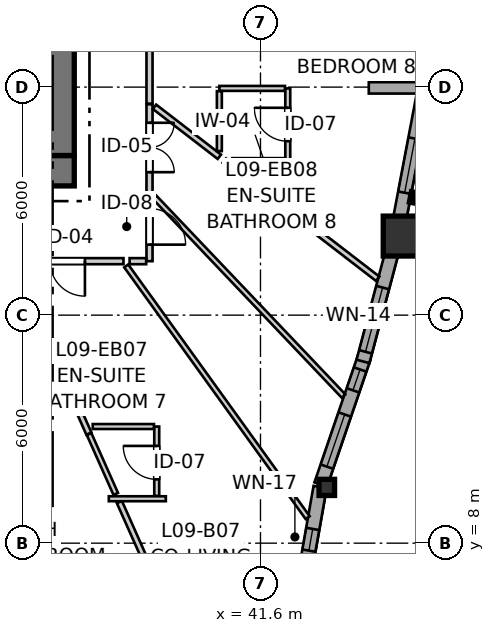
"""IFC4 building model, lengths in metres.
Left out: names, types, materials, properties, quantities, classifications, styles, units other than length and angle.
Written with IfcOpenShell. Run it as: python <this file> out.ifc"""

import sys

from ifc_helpers import new_model, si_unit, direction, frame, frame_2d, origin, origin_2d, place, context, subcontext, project, spatial, rectangle, i_section, extrude, source, transform, mapped, element, fill, save


model = new_model("IFC4")
c1 = context("Model", 3, precision=1e-05, world=origin(), true_north=direction((0.0, 1.0)))
c2 = subcontext(c1, "Body", "Model", "MODEL_VIEW")
j1 = project(units=[si_unit("LENGTHUNIT", "METRE"), si_unit("PLANEANGLEUNIT", "RADIAN")], contexts=[c1])
p1 = place(None, origin())
s1 = spatial("IfcSite", under=j1, at=p1, CompositionType="ELEMENT")
p2 = place(p1, origin())
s2 = spatial("IfcBuilding", under=s1, at=p2, CompositionType="ELEMENT")
p3 = place(p2, frame((0.0, 0.0, 33.4)))
s3 = spatial("IfcBuildingStorey", under=s2, at=p3, CompositionType="ELEMENT", Elevation=33.4)
p4 = place(p3, frame((24.0, 17.8, 0.0), z_axis=(0.0, 0.0, 1.0), x_axis=(1.0, 0.0, 0.0)))
e1 = element("IfcWall", 1, at=p4, inside=s3, PredefinedType="SHEAR", context=c2, shape_type="SweptSolid", body=[
    extrude(rectangle(XDim=12.7, YDim=0.8, at=frame_2d((6.35, 0.0))), origin(), (0.0, 0.0, 1.0), 2.94),
])
p5 = place(p3, frame((36.3, 18.2, 0.0), z_axis=(0.0, 0.0, 1.0), x_axis=(0.0, 1.0, 0.0)))
e2 = element("IfcWall", 2, at=p5, inside=s3, PredefinedType="SHEAR", context=c2, shape_type="SweptSolid", body=[
    extrude(rectangle(XDim=15.6, YDim=0.8, at=frame_2d((7.8, 0.0))), origin(), (0.0, 0.0, 1.0), 2.94),
])
p6 = place(p5, frame((4.25, 0.0, 0.0)))
e3 = element("IfcOpeningElement", 3, at=p6, cuts=e2, PredefinedType="OPENING", context=c2, shape_type="SweptSolid", body=[
    extrude(rectangle(XDim=1.1, YDim=2.15, at=frame_2d((0.55, 1.075))), frame((0.0, 0.41, 0.0), z_axis=(0.0, -1.0, 0.0), x_axis=(1.0, 0.0, 0.0)), (0.0, 0.0, 1.0), 0.82),
])
p7 = place(p5, frame((10.25, 0.0, 0.0)))
e4 = element("IfcOpeningElement", 4, at=p7, cuts=e2, PredefinedType="OPENING", context=c2, shape_type="SweptSolid", body=[
    extrude(rectangle(XDim=1.1, YDim=2.15, at=frame_2d((0.55, 1.075))), frame((0.0, 0.41, 0.0), z_axis=(0.0, -1.0, 0.0), x_axis=(1.0, 0.0, 0.0)), (0.0, 0.0, 1.0), 0.82),
])
m1 = source(origin(), c2, "Body", "SweptSolid", [
    extrude(i_section(OverallWidth=0.409, OverallDepth=0.425, WebThickness=0.03, FlangeThickness=0.048, FilletRadius=0.015, at=origin_2d()), origin(), (0.0, 0.0, 1.0), 2.94),
])
p8 = place(p3, frame((43.345, 9.468, 0.0), z_axis=(0.0, 0.0, 1.0), x_axis=(1.0, 0.0, 0.0)))
e5 = element("IfcColumn", 5, at=p8, inside=s3, PredefinedType="PILASTER", context=c2, shape_type="MappedRepresentation", body=[
    mapped(m1, transform((0.0, 0.0, 0.0), x_axis=(1.0, 0.0, 0.0), y_axis=(0.0, 1.0, 0.0), z_axis=(0.0, 0.0, 1.0), scale=1.0)),
])
m2 = source(origin(), c2, "Body", "SweptSolid", [
    extrude(rectangle(XDim=1.05, YDim=1.05, at=origin_2d()), origin(), (0.0, 0.0, 1.0), 2.94),
])
p9 = place(p3, frame((45.355, 16.081, 0.0), z_axis=(0.0, 0.0, 1.0), x_axis=(1.0, 0.0, 0.0)))
e6 = element("IfcColumn", 6, at=p9, inside=s3, PredefinedType="COLUMN", context=c2, shape_type="MappedRepresentation", body=[
    mapped(m2, transform((0.0, 0.0, 0.0), x_axis=(1.0, 0.0, 0.0), y_axis=(0.0, 1.0, 0.0), z_axis=(0.0, 0.0, 1.0), scale=1.0)),
])
p10 = place(p3, frame((42.816, 7.477, 0.0), z_axis=(0.0, 0.0, 1.0), x_axis=(0.173586593252, 0.984818610021, 0.0)))
e7 = element("IfcWall", 7, at=p10, inside=s3, PredefinedType="SOLIDWALL", context=c2, shape_type="SweptSolid", body=[
    extrude(rectangle(XDim=2.032, YDim=0.35, at=frame_2d((1.016, 0.0))), origin(), (0.0, 0.0, 1.0), 2.42),
])
p11 = place(p10, frame((0.332, 0.0, 0.82)))
e8 = element("IfcOpeningElement", 8, at=p11, cuts=e7, PredefinedType="OPENING", context=c2, shape_type="SweptSolid", body=[
    extrude(rectangle(XDim=0.58, YDim=1.35, at=frame_2d((0.29, 0.675))), frame((0.0, 0.185, 0.0), z_axis=(0.0, -1.0, 0.0), x_axis=(1.0, 0.0, 0.0)), (0.0, 0.0, 1.0), 0.37),
])
p12 = place(p3, frame((43.186, 9.543, 0.0), z_axis=(0.0, 0.0, 1.0), x_axis=(0.323620542135, 0.946186950189, 0.0)))
e9 = element("IfcWall", 9, at=p12, inside=s3, PredefinedType="SOLIDWALL", context=c2, shape_type="SweptSolid", body=[
    extrude(rectangle(XDim=3.512, YDim=0.35, at=frame_2d((1.756, 0.0))), origin(), (0.0, 0.0, 1.0), 2.42),
])
p13 = place(p12, frame((0.498, 0.0, 0.82)))
e10 = element("IfcOpeningElement", 10, at=p13, cuts=e9, PredefinedType="OPENING", context=c2, shape_type="SweptSolid", body=[
    extrude(rectangle(XDim=1.45, YDim=1.25, at=frame_2d((0.725, 0.625))), frame((0.0, 0.185, 0.0), z_axis=(0.0, -1.0, 0.0), x_axis=(1.0, 0.0, 0.0)), (0.0, 0.0, 1.0), 0.37),
])
p14 = place(p12, frame((2.619, 0.0, 0.82)))
e11 = element("IfcOpeningElement", 11, at=p14, cuts=e9, PredefinedType="OPENING", context=c2, shape_type="SweptSolid", body=[
    extrude(rectangle(XDim=0.58, YDim=1.35, at=frame_2d((0.29, 0.675))), frame((0.0, 0.185, 0.0), z_axis=(0.0, -1.0, 0.0), x_axis=(1.0, 0.0, 0.0)), (0.0, 0.0, 1.0), 0.37),
])
p15 = place(p3, frame((44.297, 12.782, 0.0), z_axis=(0.0, 0.0, 1.0), x_axis=(0.257090265476, 0.96638739406, 0.0)))
e12 = element("IfcWall", 12, at=p15, inside=s3, PredefinedType="SOLIDWALL", context=c2, shape_type="SweptSolid", body=[
    extrude(rectangle(XDim=3.159, YDim=0.35, at=frame_2d((1.58, 0.0))), origin(), (0.0, 0.0, 1.0), 2.42),
])
p16 = place(p15, frame((0.261, 0.0, 0.82)))
e13 = element("IfcOpeningElement", 13, at=p16, cuts=e12, PredefinedType="OPENING", context=c2, shape_type="SweptSolid", body=[
    extrude(rectangle(XDim=1.75, YDim=1.3, at=frame_2d((0.875, 0.65))), frame((0.0, 0.185, 0.0), z_axis=(0.0, -1.0, 0.0), x_axis=(1.0, 0.0, 0.0)), (0.0, 0.0, 1.0), 0.37),
])
p17 = place(p3, frame((45.24, 16.408, 0.0), z_axis=(0.0, 0.0, 1.0), x_axis=(0.186636709983, 0.982428999209, 0.0)))
e14 = element("IfcWall", 14, at=p17, inside=s3, PredefinedType="SOLIDWALL", context=c2, shape_type="SweptSolid", body=[
    extrude(rectangle(XDim=3.446, YDim=0.35, at=frame_2d((1.723, 0.0))), origin(), (0.0, 0.0, 1.0), 2.42),
])
p18 = place(p17, frame((0.828, 0.0, 0.82)))
e15 = element("IfcOpeningElement", 15, at=p18, cuts=e14, PredefinedType="OPENING", context=c2, shape_type="SweptSolid", body=[
    extrude(rectangle(XDim=1.45, YDim=1.25, at=frame_2d((0.725, 0.625))), frame((0.0, 0.185, 0.0), z_axis=(0.0, -1.0, 0.0), x_axis=(1.0, 0.0, 0.0)), (0.0, 0.0, 1.0), 0.37),
])
p19 = place(p3, frame((44.45, 19.98, 0.0), z_axis=(0.0, 0.0, 1.0), x_axis=(1.0, 0.0, 0.0)))
e16 = element("IfcWall", 16, at=p19, inside=s3, PredefinedType="SOLIDWALL", context=c2, shape_type="SweptSolid", body=[
    extrude(rectangle(XDim=20.685, YDim=0.3, at=frame_2d((10.342, 0.0))), origin(), (0.0, 0.0, 1.0), 2.12),
])
p20 = place(p3, frame((38.68, 23.699, 0.0), z_axis=(0.0, 0.0, 1.0), x_axis=(0.0, -1.0, 0.0)))
e17 = element("IfcWall", 17, at=p20, inside=s3, PredefinedType="PARTITIONING", context=c2, shape_type="SweptSolid", body=[
    extrude(rectangle(XDim=4.135, YDim=0.16, at=frame_2d((2.067, 0.0))), origin(), (0.0, 0.0, 1.0), 2.94),
])
p21 = place(p20, frame((1.583, 0.0, 0.0)))
e18 = element("IfcOpeningElement", 18, at=p21, cuts=e17, PredefinedType="OPENING", context=c2, shape_type="SweptSolid", body=[
    extrude(rectangle(XDim=0.92, YDim=2.1, at=frame_2d((0.46, 1.05))), frame((0.0, 0.09, 0.0), z_axis=(0.0, -1.0, 0.0), x_axis=(1.0, 0.0, 0.0)), (0.0, 0.0, 1.0), 0.18),
])
p22 = place(p3, frame((37.995, 15.42, 0.0), z_axis=(0.0, 0.0, 1.0), x_axis=(-1.0, 0.0, 0.0)))
e19 = element("IfcWall", 19, at=p22, inside=s3, PredefinedType="PARTITIONING", context=c2, shape_type="SweptSolid", body=[
    extrude(rectangle(XDim=2.9, YDim=0.16, at=frame_2d((1.45, 0.0))), origin(), (0.0, 0.0, 1.0), 2.94),
])
p23 = place(p22, frame((1.014, 0.0, 0.0)))
e20 = element("IfcOpeningElement", 20, at=p23, cuts=e19, PredefinedType="OPENING", context=c2, shape_type="SweptSolid", body=[
    extrude(rectangle(XDim=0.92, YDim=2.1, at=frame_2d((0.46, 1.05))), frame((0.0, 0.09, 0.0), z_axis=(0.0, -1.0, 0.0), x_axis=(1.0, 0.0, 0.0)), (0.0, 0.0, 1.0), 0.18),
])
p24 = place(p3, frame((38.68, 19.549, 0.0), z_axis=(0.0, 0.0, 1.0), x_axis=(0.0, -1.0, 0.0)))
e21 = element("IfcWall", 21, at=p24, inside=s3, PredefinedType="PARTITIONING", context=c2, shape_type="SweptSolid", body=[
    extrude(rectangle(XDim=2.331, YDim=0.16, at=frame_2d((1.166, 0.0))), origin(), (0.0, 0.0, 1.0), 2.94),
])
p25 = place(p24, frame((0.488, 0.0, 0.0)))
e22 = element("IfcOpeningElement", 22, at=p25, cuts=e21, PredefinedType="OPENING", context=c2, shape_type="SweptSolid", body=[
    extrude(rectangle(XDim=1.3, YDim=2.1, at=frame_2d((0.65, 1.05))), frame((0.0, 0.09, 0.0), z_axis=(0.0, -1.0, 0.0), x_axis=(1.0, 0.0, 0.0)), (0.0, 0.0, 1.0), 0.18),
])
p26 = place(p3, frame((42.318, 18.066, 0.0), z_axis=(0.0, 0.0, 1.0), x_axis=(0.0, 1.0, 0.0)))
e23 = element("IfcWall", 23, at=p26, inside=s3, PredefinedType="PARTITIONING", context=c2, shape_type="SweptSolid", body=[
    extrude(rectangle(XDim=1.9, YDim=0.13, at=frame_2d((0.95, 0.0))), origin(), (0.0, 0.0, 1.0), 2.94),
])
p27 = place(p26, frame((0.51, 0.0, 0.0)))
e24 = element("IfcOpeningElement", 24, at=p27, cuts=e23, PredefinedType="OPENING", context=c2, shape_type="SweptSolid", body=[
    extrude(rectangle(XDim=0.88, YDim=2.05, at=frame_2d((0.44, 1.025))), frame((0.0, 0.075, 0.0), z_axis=(0.0, -1.0, 0.0), x_axis=(1.0, 0.0, 0.0)), (0.0, 0.0, 1.0), 0.15),
])
p28 = place(p3, frame((38.87, 9.242, 0.0), z_axis=(0.0, 0.0, 1.0), x_axis=(0.0, 1.0, 0.0)))
e25 = element("IfcWall", 25, at=p28, inside=s3, PredefinedType="PARTITIONING", context=c2, shape_type="SweptSolid", body=[
    extrude(rectangle(XDim=1.827, YDim=0.13, at=frame_2d((0.914, 0.0))), origin(), (0.0, 0.0, 1.0), 2.94),
])
p29 = place(p28, frame((0.437, 0.0, 0.0)))
e26 = element("IfcOpeningElement", 26, at=p29, cuts=e25, PredefinedType="OPENING", context=c2, shape_type="SweptSolid", body=[
    extrude(rectangle(XDim=0.88, YDim=2.05, at=frame_2d((0.44, 1.025))), frame((0.0, 0.075, 0.0), z_axis=(0.0, -1.0, 0.0), x_axis=(1.0, 0.0, 0.0)), (0.0, 0.0, 1.0), 0.15),
])
p30 = place(p3, frame((38.68, 17.203, 0.0), z_axis=(0.0, 0.0, 1.0), x_axis=(0.0, -1.0, 0.0)))
e27 = element("IfcWall", 27, at=p30, inside=s3, PredefinedType="PARTITIONING", context=c2, shape_type="SweptSolid", body=[
    extrude(rectangle(XDim=1.783, YDim=0.16, at=frame_2d((0.892, 0.0))), origin(), (0.0, 0.0, 1.0), 2.94),
])
p31 = place(p30, frame((0.398, 0.0, 0.0)))
e28 = element("IfcOpeningElement", 28, at=p31, cuts=e27, PredefinedType="OPENING", context=c2, shape_type="SweptSolid", body=[
    extrude(rectangle(XDim=0.95, YDim=2.1, at=frame_2d((0.475, 1.05))), frame((0.0, 0.09, 0.0), z_axis=(0.0, -1.0, 0.0), x_axis=(1.0, 0.0, 0.0)), (0.0, 0.0, 1.0), 0.18),
])
p32 = place(p3, frame((38.067, 15.295, 0.0), z_axis=(0.0, 0.0, 1.0), x_axis=(0.584777320582, -0.811193864211, 0.0)))
e29 = element("IfcWall", 29, at=p32, inside=s3, PredefinedType="PARTITIONING", context=c2, shape_type="SweptSolid", body=[
    extrude(rectangle(XDim=8.164, YDim=0.13, at=frame_2d((4.082, 0.0))), origin(), (0.0, 0.0, 1.0), 2.94),
])
p33 = place(p3, frame((38.812, 17.101, 0.0), z_axis=(0.0, 0.0, 1.0), x_axis=(0.689140556814, -0.724627692649, 0.0)))
e30 = element("IfcWall", 30, at=p33, inside=s3, PredefinedType="PARTITIONING", context=c2, shape_type="SweptSolid", body=[
    extrude(rectangle(XDim=7.217, YDim=0.13, at=frame_2d((3.608, 0.0))), origin(), (0.0, 0.0, 1.0), 2.94),
])
p34 = place(p3, frame((40.649, 18.066, 0.0), z_axis=(0.0, 0.0, 1.0), x_axis=(0.792155051101, -0.610319895641, 0.0)))
e31 = element("IfcWall", 31, at=p34, inside=s3, PredefinedType="PARTITIONING", context=c2, shape_type="SweptSolid", body=[
    extrude(rectangle(XDim=5.093, YDim=0.145, at=frame_2d((2.546, 0.0))), origin(), (0.0, 0.0, 1.0), 2.94),
])
p35 = place(p3, frame((37.887, 9.082, 0.0), z_axis=(0.0, 0.0, 1.0), x_axis=(0.406941066305, -0.913454415149, 0.0)))
e32 = element("IfcWall", 32, at=p35, inside=s3, PredefinedType="PARTITIONING", context=c2, shape_type="SweptSolid", body=[
    extrude(rectangle(XDim=4.882, YDim=0.145, at=frame_2d((2.441, 0.0))), origin(), (0.0, 0.0, 1.0), 2.94),
])
p36 = place(p3, frame((35.116, 15.303, 0.0), z_axis=(0.0, 0.0, 1.0), x_axis=(0.406910733823, -0.913467927571, 0.0)))
e33 = element("IfcWall", 33, at=p36, inside=s3, PredefinedType="PARTITIONING", context=c2, shape_type="SweptSolid", body=[
    extrude(rectangle(XDim=4.839, YDim=0.145, at=frame_2d((2.419, 0.0))), origin(), (0.0, 0.0, 1.0), 2.94),
])
p37 = place(p3, frame((38.811, 19.482, 0.0), z_axis=(0.0, 0.0, 1.0), x_axis=(0.792185877025, -0.61027988353, 0.0)))
e34 = element("IfcWall", 34, at=p37, inside=s3, PredefinedType="PARTITIONING", context=c2, shape_type="SweptSolid", body=[
    extrude(rectangle(XDim=2.156, YDim=0.145, at=frame_2d((1.078, 0.0))), origin(), (0.0, 0.0, 1.0), 2.94),
])
p38 = place(p3, frame((37.091, 10.869, 0.0), z_axis=(0.0, 0.0, 1.0), x_axis=(0.406835672622, -0.913501360416, 0.0)))
e35 = element("IfcWall", 35, at=p38, inside=s3, PredefinedType="PARTITIONING", context=c2, shape_type="SweptSolid", body=[
    extrude(rectangle(XDim=1.722, YDim=0.13, at=frame_2d((0.861, 0.0))), origin(), (0.0, 0.0, 1.0), 2.94),
])
p39 = place(p3, frame((37.186, 11.069, 0.0), z_axis=(0.0, 0.0, 1.0), x_axis=(1.0, 0.0, 0.0)))
e36 = element("IfcWall", 36, at=p39, inside=s3, PredefinedType="PARTITIONING", context=c2, shape_type="SweptSolid", body=[
    extrude(rectangle(XDim=1.611, YDim=0.13, at=frame_2d((0.805, 0.0))), origin(), (0.0, 0.0, 1.0), 2.94),
])
p40 = place(p3, frame((40.518, 19.966, 0.0), z_axis=(0.0, 0.0, 1.0), x_axis=(1.0, 0.0, 0.0)))
e37 = element("IfcWall", 37, at=p40, inside=s3, PredefinedType="PARTITIONING", context=c2, shape_type="SweptSolid", body=[
    extrude(rectangle(XDim=1.727, YDim=0.13, at=frame_2d((0.864, 0.0))), origin(), (0.0, 0.0, 1.0), 2.108),
])
p41 = place(p3, frame((40.518, 18.317, 0.0), z_axis=(0.0, 0.0, 1.0), x_axis=(0.0, 1.0, 0.0)))
e38 = element("IfcWall", 38, at=p41, inside=s3, PredefinedType="PARTITIONING", context=c2, shape_type="SweptSolid", body=[
    extrude(rectangle(XDim=1.576, YDim=0.13, at=frame_2d((0.788, 0.0))), origin(), (0.0, 0.0, 1.0), 2.94),
])
p42 = place(p3, frame((40.86, 18.066, 0.0), z_axis=(0.0, 0.0, 1.0), x_axis=(1.0, 0.0, 0.0)))
e39 = element("IfcWall", 39, at=p42, inside=s3, PredefinedType="PARTITIONING", context=c2, shape_type="SweptSolid", body=[
    extrude(rectangle(XDim=1.385, YDim=0.13, at=frame_2d((0.692, 0.0))), origin(), (0.0, 0.0, 1.0), 2.94),
])
p43 = place(p3, frame((37.609, 9.169, 0.0), z_axis=(0.0, 0.0, 1.0), x_axis=(1.0, 0.0, 0.0)))
e40 = element("IfcWall", 40, at=p43, inside=s3, PredefinedType="PARTITIONING", context=c2, shape_type="SweptSolid", body=[
    extrude(rectangle(XDim=1.501, YDim=0.13, at=frame_2d((0.75, 0.0))), origin(), (0.0, 0.0, 1.0), 2.94),
])
p44 = place(p3, frame((38.156, 15.42, 0.0), z_axis=(0.0, 0.0, 1.0), x_axis=(1.0, 0.0, 0.0)))
e41 = element("IfcWall", 41, at=p44, inside=s3, PredefinedType="PARTITIONING", context=c2, shape_type="SweptSolid", body=[
    extrude(rectangle(XDim=0.436, YDim=0.16, at=frame_2d((0.218, 0.0))), origin(), (0.0, 0.0, 1.0), 2.94),
])
m3 = source(origin(), c2, "Body", "SweptSolid", [
    extrude(rectangle(XDim=0.58, YDim=1.35, at=frame_2d((0.29, 0.675))), frame((0.0, 0.03, 0.0), z_axis=(0.0, -1.0, 0.0), x_axis=(1.0, 0.0, 0.0)), (0.0, 0.0, 1.0), 0.06),
])
p45 = place(p11, origin())
e42 = element("IfcWindow", 42, at=p45, inside=s3, PartitioningType="SINGLE_PANEL", PredefinedType="WINDOW", context=c2, shape_type="MappedRepresentation", body=[
    mapped(m3, transform((0.0, 0.0, 0.0), x_axis=(1.0, 0.0, 0.0), y_axis=(0.0, 1.0, 0.0), z_axis=(0.0, 0.0, 1.0), scale=1.0)),
])
fill(e8, e42)
m4 = source(origin(), c2, "Body", "SweptSolid", [
    extrude(rectangle(XDim=1.45, YDim=1.25, at=frame_2d((0.725, 0.625))), frame((0.0, 0.03, 0.0), z_axis=(0.0, -1.0, 0.0), x_axis=(1.0, 0.0, 0.0)), (0.0, 0.0, 1.0), 0.06),
])
p46 = place(p13, origin())
e43 = element("IfcWindow", 43, at=p46, inside=s3, PartitioningType="SINGLE_PANEL", PredefinedType="WINDOW", context=c2, shape_type="MappedRepresentation", body=[
    mapped(m4, transform((0.0, 0.0, 0.0), x_axis=(1.0, 0.0, 0.0), y_axis=(0.0, 1.0, 0.0), z_axis=(0.0, 0.0, 1.0), scale=1.0)),
])
fill(e10, e43)
p47 = place(p14, origin())
e44 = element("IfcWindow", 44, at=p47, inside=s3, PartitioningType="SINGLE_PANEL", PredefinedType="WINDOW", context=c2, shape_type="MappedRepresentation", body=[
    mapped(m3, transform((0.0, 0.0, 0.0), x_axis=(1.0, 0.0, 0.0), y_axis=(0.0, 1.0, 0.0), z_axis=(0.0, 0.0, 1.0), scale=1.0)),
])
fill(e11, e44)
m5 = source(origin(), c2, "Body", "SweptSolid", [
    extrude(rectangle(XDim=1.75, YDim=1.3, at=frame_2d((0.875, 0.65))), frame((0.0, 0.03, 0.0), z_axis=(0.0, -1.0, 0.0), x_axis=(1.0, 0.0, 0.0)), (0.0, 0.0, 1.0), 0.06),
])
p48 = place(p16, origin())
e45 = element("IfcWindow", 45, at=p48, inside=s3, PartitioningType="SINGLE_PANEL", PredefinedType="WINDOW", context=c2, shape_type="MappedRepresentation", body=[
    mapped(m5, transform((0.0, 0.0, 0.0), x_axis=(1.0, 0.0, 0.0), y_axis=(0.0, 1.0, 0.0), z_axis=(0.0, 0.0, 1.0), scale=1.0)),
])
fill(e13, e45)
p49 = place(p18, origin())
e46 = element("IfcWindow", 46, at=p49, inside=s3, PartitioningType="SINGLE_PANEL", PredefinedType="WINDOW", context=c2, shape_type="MappedRepresentation", body=[
    mapped(m4, transform((0.0, 0.0, 0.0), x_axis=(1.0, 0.0, 0.0), y_axis=(0.0, 1.0, 0.0), z_axis=(0.0, 0.0, 1.0), scale=1.0)),
])
fill(e15, e46)
m6 = source(origin(), c2, "Body", "SweptSolid", [
    extrude(rectangle(XDim=0.92, YDim=2.1, at=frame_2d((0.46, 1.05))), frame((0.0, 0.025, 0.0), z_axis=(0.0, -1.0, 0.0), x_axis=(1.0, 0.0, 0.0)), (0.0, 0.0, 1.0), 0.05),
])
p50 = place(p23, origin())
e47 = element("IfcDoor", 47, at=p50, inside=s3, OperationType="SINGLE_SWING_LEFT", PredefinedType="DOOR", context=c2, shape_type="MappedRepresentation", body=[
    mapped(m6, transform((0.0, 0.0, 0.0), x_axis=(1.0, 0.0, 0.0), y_axis=(0.0, 1.0, 0.0), z_axis=(0.0, 0.0, 1.0), scale=1.0)),
])
fill(e20, e47)
m7 = source(origin(), c2, "Body", "SweptSolid", [
    extrude(rectangle(XDim=1.3, YDim=2.1, at=frame_2d((0.65, 1.05))), frame((0.0, 0.025, 0.0), z_axis=(0.0, -1.0, 0.0), x_axis=(1.0, 0.0, 0.0)), (0.0, 0.0, 1.0), 0.05),
])
p51 = place(p25, origin())
e48 = element("IfcDoor", 48, at=p51, inside=s3, OperationType="DOUBLE_DOOR_SINGLE_SWING", PredefinedType="DOOR", context=c2, shape_type="MappedRepresentation", body=[
    mapped(m7, transform((0.0, 0.0, 0.0), x_axis=(1.0, 0.0, 0.0), y_axis=(0.0, 1.0, 0.0), z_axis=(0.0, 0.0, 1.0), scale=1.0)),
])
fill(e22, e48)
m8 = source(origin(), c2, "Body", "SweptSolid", [
    extrude(rectangle(XDim=0.88, YDim=2.05, at=frame_2d((0.44, 1.025))), frame((0.0, 0.025, 0.0), z_axis=(0.0, -1.0, 0.0), x_axis=(1.0, 0.0, 0.0)), (0.0, 0.0, 1.0), 0.05),
])
p52 = place(p27, origin())
e49 = element("IfcDoor", 49, at=p52, inside=s3, OperationType="SINGLE_SWING_RIGHT", PredefinedType="DOOR", context=c2, shape_type="MappedRepresentation", body=[
    mapped(m8, transform((0.0, 0.0, 0.0), x_axis=(1.0, 0.0, 0.0), y_axis=(0.0, 1.0, 0.0), z_axis=(0.0, 0.0, 1.0), scale=1.0)),
])
fill(e24, e49)
p53 = place(p29, origin())
e50 = element("IfcDoor", 50, at=p53, inside=s3, OperationType="SINGLE_SWING_RIGHT", PredefinedType="DOOR", context=c2, shape_type="MappedRepresentation", body=[
    mapped(m8, transform((0.0, 0.0, 0.0), x_axis=(1.0, 0.0, 0.0), y_axis=(0.0, 1.0, 0.0), z_axis=(0.0, 0.0, 1.0), scale=1.0)),
])
fill(e26, e50)
m9 = source(origin(), c2, "Body", "SweptSolid", [
    extrude(rectangle(XDim=0.95, YDim=2.1, at=frame_2d((0.475, 1.05))), frame((0.0, 0.025, 0.0), z_axis=(0.0, -1.0, 0.0), x_axis=(1.0, 0.0, 0.0)), (0.0, 0.0, 1.0), 0.05),
])
p54 = place(p31, origin())
e51 = element("IfcDoor", 51, at=p54, inside=s3, OperationType="SINGLE_SWING_RIGHT", PredefinedType="DOOR", context=c2, shape_type="MappedRepresentation", body=[
    mapped(m9, transform((0.0, 0.0, 0.0), x_axis=(1.0, 0.0, 0.0), y_axis=(0.0, 1.0, 0.0), z_axis=(0.0, 0.0, 1.0), scale=1.0)),
])
fill(e28, e51)
save(model, sys.argv[1])
